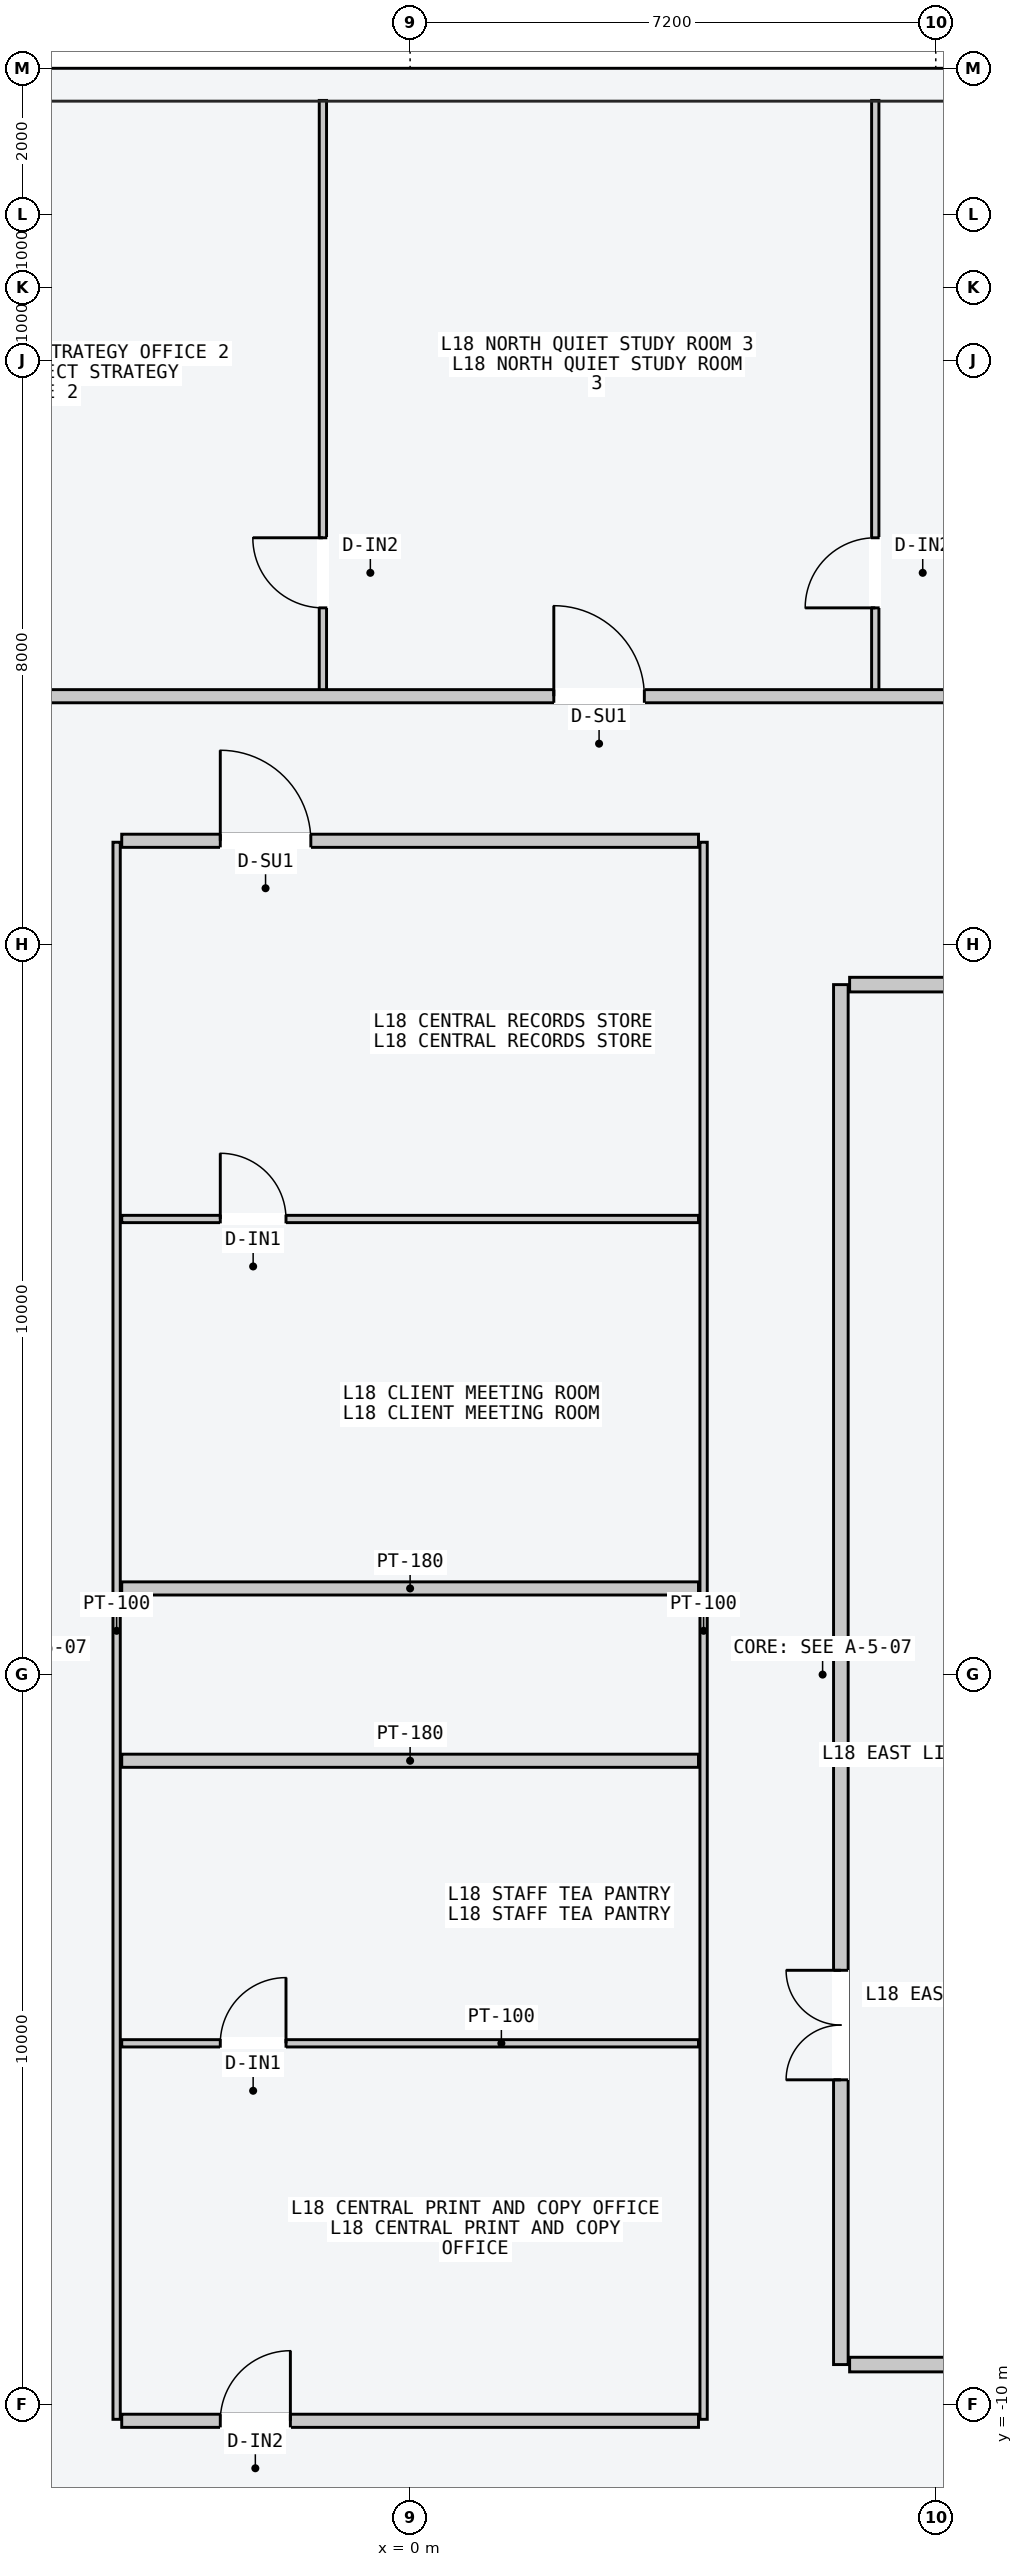
"""IFC4 building model, lengths in metres.
Left out: names, types, materials, properties, quantities, classifications, styles, units other than length and angle.
Written with IfcOpenShell. Run it as: python <this file> out.ifc"""

import sys

from ifc_helpers import new_model, si_unit, direction, frame, frame_2d, origin, place, context, subcontext, project, spatial, rectangle, extrude, element, fill, save


model = new_model("IFC4")
c1 = context("Model", 3, precision=1e-05, world=origin(), true_north=direction((0.0, 1.0)))
c2 = subcontext(c1, "Body", "Model", "MODEL_VIEW")
j1 = project(units=[si_unit("LENGTHUNIT", "METRE"), si_unit("PLANEANGLEUNIT", "RADIAN")], contexts=[c1])
p1 = place(None, origin())
s1 = spatial("IfcSite", under=j1, at=p1, CompositionType="ELEMENT")
p2 = place(p1, origin())
s2 = spatial("IfcBuilding", under=s1, at=p2, CompositionType="ELEMENT")
p3 = place(p2, frame((0.0, 0.0, 70.8)))
s3 = spatial("IfcBuildingStorey", under=s2, at=p3, CompositionType="ELEMENT", Elevation=70.8)
p4 = place(p3, frame((5.9, -9.45, 0.0), z_axis=(0.0, 0.0, 1.0), x_axis=(0.0, 1.0, 0.0)))
e1 = element("IfcWall", 1, at=p4, inside=s3, PredefinedType="PARTITIONING", context=c2, shape_type="SweptSolid", body=[
    extrude(rectangle(XDim=18.9, YDim=0.2, at=frame_2d((9.45, 0.0))), origin(), (0.0, 0.0, 1.0), 3.4),
])
p5 = place(p4, frame((3.9, 0.0, 0.0)))
e2 = element("IfcOpeningElement", 2, at=p5, cuts=e1, PredefinedType="OPENING", context=c2, shape_type="SweptSolid", body=[
    extrude(rectangle(XDim=1.5, YDim=2.2, at=frame_2d((0.75, 1.1))), frame((0.0, 0.11, 0.0), z_axis=(0.0, -1.0, 0.0), x_axis=(1.0, 0.0, 0.0)), (0.0, 0.0, 1.0), 0.22),
])
for number, where, z_axis, x_axis in (
    (3, (6.02, -9.45, 0.0), (0.0, 0.0, 1.0), (1.0, 0.0, 0.0)),
    (4, (6.02, 9.45, 0.0), (0.0, 0.0, 1.0), (1.0, 0.0, 0.0)),
):
    element("IfcWall", number, at=place(p3, frame(where, z_axis=z_axis, x_axis=x_axis)), inside=s3, PredefinedType="PARTITIONING", context=c2, shape_type="SweptSolid", body=[
        extrude(rectangle(XDim=1.8, YDim=0.2, at=frame_2d((0.9, 0.0))), origin(), (0.0, 0.0, 1.0), 3.4),
    ])
for number, where, z_axis, x_axis in (
    (5, (-4.02, -10.2, 0.0), (0.0, 0.0, 1.0), (0.0, 1.0, 0.0)),
    (6, (4.02, -10.2, 0.0), (0.0, 0.0, 1.0), (0.0, 1.0, 0.0)),
):
    element("IfcWall", number, at=place(p3, frame(where, z_axis=z_axis, x_axis=x_axis)), inside=s3, PredefinedType="PARTITIONING", context=c2, shape_type="SweptSolid", body=[
        extrude(rectangle(XDim=21.6, YDim=0.1, at=frame_2d((10.8, 0.0))), origin(), (0.0, 0.0, 1.0), 3.4),
    ])
p6 = place(p3, frame((-3.95, 1.18, 0.0), z_axis=(0.0, 0.0, 1.0), x_axis=(1.0, 0.0, 0.0)))
e7 = element("IfcWall", 7, at=p6, inside=s3, PredefinedType="PARTITIONING", context=c2, shape_type="SweptSolid", body=[
    extrude(rectangle(XDim=7.9, YDim=0.18, at=frame_2d((3.95, 0.0))), origin(), (0.0, 0.0, 1.0), 3.4),
])
p7 = place(p3, frame((-3.95, 11.42, 0.0), z_axis=(0.0, 0.0, 1.0), x_axis=(1.0, 0.0, 0.0)))
e8 = element("IfcWall", 8, at=p7, inside=s3, PredefinedType="PARTITIONING", context=c2, shape_type="SweptSolid", body=[
    extrude(rectangle(XDim=7.9, YDim=0.18, at=frame_2d((3.95, 0.0))), origin(), (0.0, 0.0, 1.0), 3.4),
])
p8 = place(p7, frame((1.35, 0.0, 0.0)))
e9 = element("IfcOpeningElement", 9, at=p8, cuts=e8, PredefinedType="OPENING", context=c2, shape_type="SweptSolid", body=[
    extrude(rectangle(XDim=1.24, YDim=2.24, at=frame_2d((0.62, 1.12))), frame((0.0, 0.1, 0.0), z_axis=(0.0, -1.0, 0.0), x_axis=(1.0, 0.0, 0.0)), (0.0, 0.0, 1.0), 0.2),
])
p9 = place(p3, frame((-3.95, -1.18, 0.0), z_axis=(0.0, 0.0, 1.0), x_axis=(1.0, 0.0, 0.0)))
e10 = element("IfcWall", 10, at=p9, inside=s3, PredefinedType="PARTITIONING", context=c2, shape_type="SweptSolid", body=[
    extrude(rectangle(XDim=7.9, YDim=0.18, at=frame_2d((3.95, 0.0))), origin(), (0.0, 0.0, 1.0), 3.4),
])
p10 = place(p3, frame((-3.95, -10.22, 0.0), z_axis=(0.0, 0.0, 1.0), x_axis=(1.0, 0.0, 0.0)))
e11 = element("IfcWall", 11, at=p10, inside=s3, PredefinedType="PARTITIONING", context=c2, shape_type="SweptSolid", body=[
    extrude(rectangle(XDim=7.9, YDim=0.18, at=frame_2d((3.95, 0.0))), origin(), (0.0, 0.0, 1.0), 3.4),
])
p11 = place(p10, frame((1.35, 0.0, 0.0)))
e12 = element("IfcOpeningElement", 12, at=p11, cuts=e11, PredefinedType="OPENING", context=c2, shape_type="SweptSolid", body=[
    extrude(rectangle(XDim=0.96, YDim=2.18, at=frame_2d((0.48, 1.09))), frame((0.0, 0.1, 0.0), z_axis=(0.0, -1.0, 0.0), x_axis=(1.0, 0.0, 0.0)), (0.0, 0.0, 1.0), 0.2),
])
p12 = place(p3, frame((-3.95, 6.24, 0.0), z_axis=(0.0, 0.0, 1.0), x_axis=(1.0, 0.0, 0.0)))
e13 = element("IfcWall", 13, at=p12, inside=s3, PredefinedType="PARTITIONING", context=c2, shape_type="SweptSolid", body=[
    extrude(rectangle(XDim=7.9, YDim=0.1, at=frame_2d((3.95, 0.0))), origin(), (0.0, 0.0, 1.0), 3.4),
])
p13 = place(p12, frame((1.35, 0.0, 0.0)))
e14 = element("IfcOpeningElement", 14, at=p13, cuts=e13, PredefinedType="OPENING", context=c2, shape_type="SweptSolid", body=[
    extrude(rectangle(XDim=0.9, YDim=2.15, at=frame_2d((0.45, 1.075))), frame((0.0, 0.06, 0.0), z_axis=(0.0, -1.0, 0.0), x_axis=(1.0, 0.0, 0.0)), (0.0, 0.0, 1.0), 0.12),
])
p14 = place(p3, frame((-3.95, -5.05, 0.0), z_axis=(0.0, 0.0, 1.0), x_axis=(1.0, 0.0, 0.0)))
e15 = element("IfcWall", 15, at=p14, inside=s3, PredefinedType="PARTITIONING", context=c2, shape_type="SweptSolid", body=[
    extrude(rectangle(XDim=7.9, YDim=0.1, at=frame_2d((3.95, 0.0))), origin(), (0.0, 0.0, 1.0), 3.4),
])
p15 = place(p14, frame((1.35, 0.0, 0.0)))
e16 = element("IfcOpeningElement", 16, at=p15, cuts=e15, PredefinedType="OPENING", context=c2, shape_type="SweptSolid", body=[
    extrude(rectangle(XDim=0.9, YDim=2.15, at=frame_2d((0.45, 1.075))), frame((0.0, 0.06, 0.0), z_axis=(0.0, -1.0, 0.0), x_axis=(1.0, 0.0, 0.0)), (0.0, 0.0, 1.0), 0.12),
])
p16 = place(p3, frame((-1.195, 13.46, 0.0), z_axis=(0.0, 0.0, 1.0), x_axis=(0.0, 1.0, 0.0)))
e17 = element("IfcWall", 17, at=p16, inside=s3, PredefinedType="PARTITIONING", context=c2, shape_type="SweptSolid", body=[
    extrude(rectangle(XDim=8.1, YDim=0.1, at=frame_2d((4.05, 0.0))), origin(), (0.0, 0.0, 1.0), 3.4),
])
p17 = place(p16, frame((1.15, 0.0, 0.0)))
e18 = element("IfcOpeningElement", 18, at=p17, cuts=e17, PredefinedType="OPENING", context=c2, shape_type="SweptSolid", body=[
    extrude(rectangle(XDim=0.96, YDim=2.18, at=frame_2d((0.48, 1.09))), frame((0.0, 0.06, 0.0), z_axis=(0.0, -1.0, 0.0), x_axis=(1.0, 0.0, 0.0)), (0.0, 0.0, 1.0), 0.12),
])
p18 = place(p3, frame((6.371, 13.46, 0.0), z_axis=(0.0, 0.0, 1.0), x_axis=(0.0, 1.0, 0.0)))
e19 = element("IfcWall", 19, at=p18, inside=s3, PredefinedType="PARTITIONING", context=c2, shape_type="SweptSolid", body=[
    extrude(rectangle(XDim=8.1, YDim=0.1, at=frame_2d((4.05, 0.0))), origin(), (0.0, 0.0, 1.0), 3.4),
])
p19 = place(p18, frame((1.15, 0.0, 0.0)))
e20 = element("IfcOpeningElement", 20, at=p19, cuts=e19, PredefinedType="OPENING", context=c2, shape_type="SweptSolid", body=[
    extrude(rectangle(XDim=0.96, YDim=2.18, at=frame_2d((0.48, 1.09))), frame((0.0, 0.06, 0.0), z_axis=(0.0, -1.0, 0.0), x_axis=(1.0, 0.0, 0.0)), (0.0, 0.0, 1.0), 0.12),
])
p20 = place(p3, frame((-19.2, 13.4, 0.0), z_axis=(0.0, 0.0, 1.0), x_axis=(1.0, 0.0, 0.0)))
e21 = element("IfcWall", 21, at=p20, inside=s3, PredefinedType="PARTITIONING", context=c2, shape_type="SweptSolid", body=[
    extrude(rectangle(XDim=38.4, YDim=0.18, at=frame_2d((19.2, 0.0))), origin(), (0.0, 0.0, 1.0), 3.4),
])
p21 = place(p20, frame((4.113, 0.0, 0.0)))
e22 = element("IfcOpeningElement", 22, at=p21, cuts=e21, PredefinedType="OPENING", context=c2, shape_type="SweptSolid", body=[
    extrude(rectangle(XDim=1.02, YDim=2.2, at=frame_2d((0.51, 1.1))), frame((0.0, 0.1, 0.0), z_axis=(0.0, -1.0, 0.0), x_axis=(1.0, 0.0, 0.0)), (0.0, 0.0, 1.0), 0.2),
])
p22 = place(p20, frame((13.095, 0.0, 0.0)))
e23 = element("IfcOpeningElement", 23, at=p22, cuts=e21, PredefinedType="OPENING", context=c2, shape_type="SweptSolid", body=[
    extrude(rectangle(XDim=1.06, YDim=2.2, at=frame_2d((0.53, 1.1))), frame((0.0, 0.1, 0.0), z_axis=(0.0, -1.0, 0.0), x_axis=(1.0, 0.0, 0.0)), (0.0, 0.0, 1.0), 0.2),
])
p23 = place(p20, frame((21.168, 0.0, 0.0)))
e24 = element("IfcOpeningElement", 24, at=p23, cuts=e21, PredefinedType="OPENING", context=c2, shape_type="SweptSolid", body=[
    extrude(rectangle(XDim=1.24, YDim=2.24, at=frame_2d((0.62, 1.12))), frame((0.0, 0.1, 0.0), z_axis=(0.0, -1.0, 0.0), x_axis=(1.0, 0.0, 0.0)), (0.0, 0.0, 1.0), 0.2),
])
p24 = place(p20, frame((28.455, 0.0, 0.0)))
e25 = element("IfcOpeningElement", 25, at=p24, cuts=e21, PredefinedType="OPENING", context=c2, shape_type="SweptSolid", body=[
    extrude(rectangle(XDim=1.4, YDim=2.2, at=frame_2d((0.7, 1.1))), frame((0.0, 0.1, 0.0), z_axis=(0.0, -1.0, 0.0), x_axis=(1.0, 0.0, 0.0)), (0.0, 0.0, 1.0), 0.2),
])
p25 = place(p20, frame((35.119, 0.0, 0.0)))
e26 = element("IfcOpeningElement", 26, at=p25, cuts=e21, PredefinedType="OPENING", context=c2, shape_type="SweptSolid", body=[
    extrude(rectangle(XDim=0.9, YDim=2.15, at=frame_2d((0.45, 1.075))), frame((0.0, 0.1, 0.0), z_axis=(0.0, -1.0, 0.0), x_axis=(1.0, 0.0, 0.0)), (0.0, 0.0, 1.0), 0.2),
])
p26 = place(p5, origin())
e27 = element("IfcDoor", 27, at=p26, inside=s3, OperationType="DOUBLE_DOOR_SINGLE_SWING", PredefinedType="DOOR", context=c2, shape_type="SweptSolid", body=[
    extrude(rectangle(XDim=1.5, YDim=2.2, at=frame_2d((0.75, 1.1))), frame((0.0, 0.025, 0.0), z_axis=(0.0, -1.0, 0.0), x_axis=(1.0, 0.0, 0.0)), (0.0, 0.0, 1.0), 0.05),
])
fill(e2, e27)
p27 = place(p8, origin())
e28 = element("IfcDoor", 28, at=p27, inside=s3, OperationType="SINGLE_SWING_LEFT", PredefinedType="DOOR", context=c2, shape_type="SweptSolid", body=[
    extrude(rectangle(XDim=1.24, YDim=2.24, at=frame_2d((0.62, 1.12))), frame((0.0, 0.025, 0.0), z_axis=(0.0, -1.0, 0.0), x_axis=(1.0, 0.0, 0.0)), (0.0, 0.0, 1.0), 0.05),
])
fill(e9, e28)
p28 = place(p11, origin())
e29 = element("IfcDoor", 29, at=p28, inside=s3, OperationType="SINGLE_SWING_RIGHT", PredefinedType="DOOR", context=c2, shape_type="SweptSolid", body=[
    extrude(rectangle(XDim=0.96, YDim=2.18, at=frame_2d((0.48, 1.09))), frame((0.0, 0.025, 0.0), z_axis=(0.0, -1.0, 0.0), x_axis=(1.0, 0.0, 0.0)), (0.0, 0.0, 1.0), 0.05),
])
fill(e12, e29)
p29 = place(p13, origin())
e30 = element("IfcDoor", 30, at=p29, inside=s3, OperationType="SINGLE_SWING_LEFT", PredefinedType="DOOR", context=c2, shape_type="SweptSolid", body=[
    extrude(rectangle(XDim=0.9, YDim=2.15, at=frame_2d((0.45, 1.075))), frame((0.0, 0.025, 0.0), z_axis=(0.0, -1.0, 0.0), x_axis=(1.0, 0.0, 0.0)), (0.0, 0.0, 1.0), 0.05),
])
fill(e14, e30)
p30 = place(p15, origin())
e31 = element("IfcDoor", 31, at=p30, inside=s3, OperationType="SINGLE_SWING_RIGHT", PredefinedType="DOOR", context=c2, shape_type="SweptSolid", body=[
    extrude(rectangle(XDim=0.9, YDim=2.15, at=frame_2d((0.45, 1.075))), frame((0.0, 0.025, 0.0), z_axis=(0.0, -1.0, 0.0), x_axis=(1.0, 0.0, 0.0)), (0.0, 0.0, 1.0), 0.05),
])
fill(e16, e31)
p31 = place(p17, origin())
e32 = element("IfcDoor", 32, at=p31, inside=s3, OperationType="SINGLE_SWING_RIGHT", PredefinedType="DOOR", context=c2, shape_type="SweptSolid", body=[
    extrude(rectangle(XDim=0.96, YDim=2.18, at=frame_2d((0.48, 1.09))), frame((0.0, 0.025, 0.0), z_axis=(0.0, -1.0, 0.0), x_axis=(1.0, 0.0, 0.0)), (0.0, 0.0, 1.0), 0.05),
])
fill(e18, e32)
p32 = place(p19, origin())
e33 = element("IfcDoor", 33, at=p32, inside=s3, OperationType="SINGLE_SWING_LEFT", PredefinedType="DOOR", context=c2, shape_type="SweptSolid", body=[
    extrude(rectangle(XDim=0.96, YDim=2.18, at=frame_2d((0.48, 1.09))), frame((0.0, 0.025, 0.0), z_axis=(0.0, -1.0, 0.0), x_axis=(1.0, 0.0, 0.0)), (0.0, 0.0, 1.0), 0.05),
])
fill(e20, e33)
p33 = place(p23, origin())
e34 = element("IfcDoor", 34, at=p33, inside=s3, OperationType="SINGLE_SWING_LEFT", PredefinedType="DOOR", context=c2, shape_type="SweptSolid", body=[
    extrude(rectangle(XDim=1.24, YDim=2.24, at=frame_2d((0.62, 1.12))), frame((0.0, 0.025, 0.0), z_axis=(0.0, -1.0, 0.0), x_axis=(1.0, 0.0, 0.0)), (0.0, 0.0, 1.0), 0.05),
])
fill(e24, e34)
save(model, sys.argv[1])
